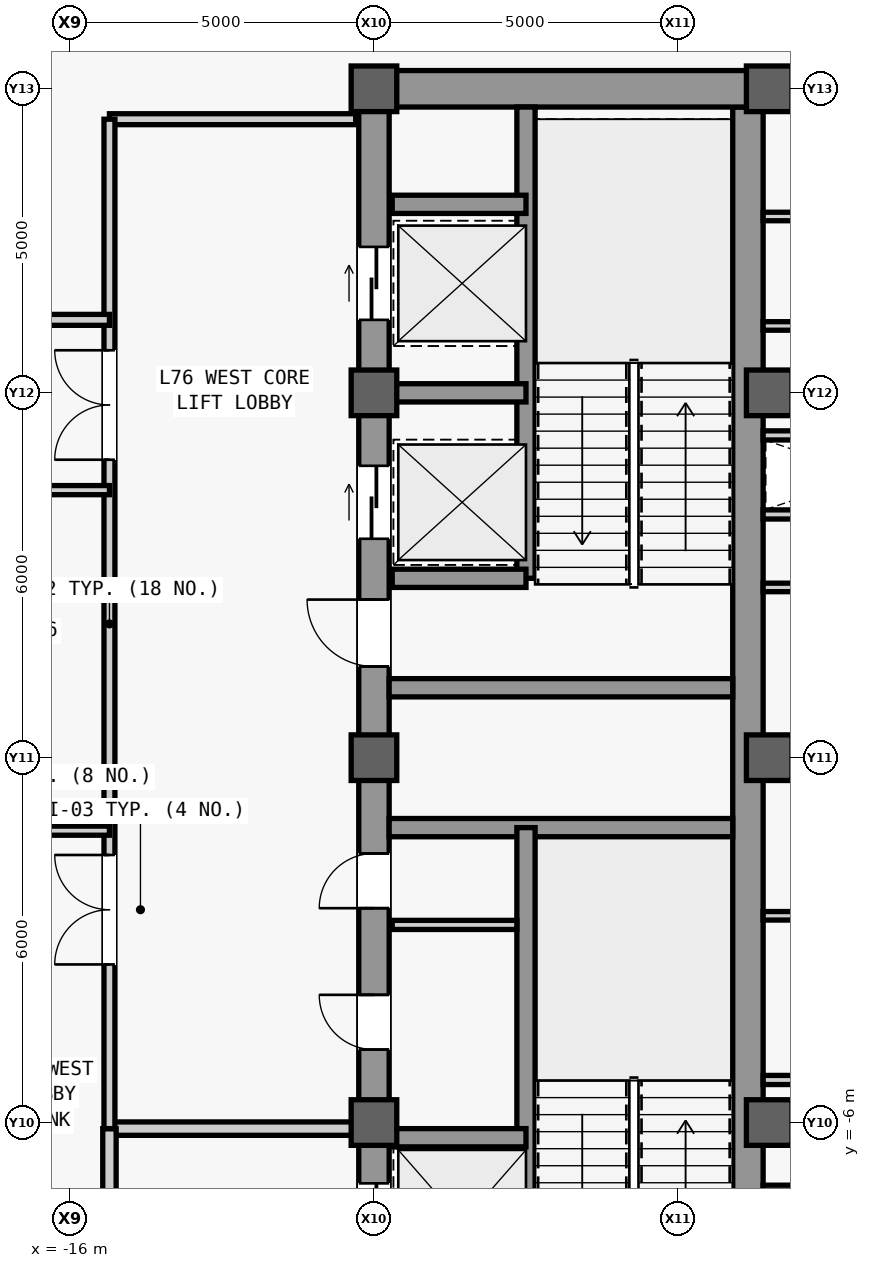
"""IFC4 building model, lengths in metres.
Left out: names, types, materials, properties, quantities, classifications, styles, units other than length and angle.
Written with IfcOpenShell. Run it as: python <this file> out.ifc"""

import sys

from ifc_helpers import new_model, si_unit, direction, frame, frame_2d, origin, origin_2d, place, context, subcontext, project, spatial, rectangle, extrude, source, transform, mapped, element, fill, save


model = new_model("IFC4")
c1 = context("Model", 3, precision=1e-05, world=origin(), true_north=direction((0.0, 1.0)))
c2 = subcontext(c1, "Body", "Model", "MODEL_VIEW")
j1 = project(units=[si_unit("LENGTHUNIT", "METRE"), si_unit("PLANEANGLEUNIT", "RADIAN")], contexts=[c1])
p1 = place(None, origin())
s1 = spatial("IfcSite", under=j1, at=p1, CompositionType="ELEMENT")
p2 = place(p1, origin())
s2 = spatial("IfcBuilding", under=s1, at=p2, CompositionType="ELEMENT")
p3 = place(p2, frame((0.0, 0.0, 321.5)))
s3 = spatial("IfcBuildingStorey", under=s2, at=p3, CompositionType="ELEMENT", Elevation=321.5)
m1 = source(origin(), c2, "Body", "SweptSolid", [
    extrude(rectangle(XDim=22.0, YDim=0.5, at=frame_2d((11.0, 0.0))), origin(), (0.0, 0.0, 1.0), 4.54),
])
p4 = place(p3, frame((-11.0, -11.0, 0.0), z_axis=(0.0, 0.0, 1.0), x_axis=(0.0, 1.0, 0.0)))
e1 = element("IfcWall", 1, at=p4, inside=s3, PredefinedType="SHEAR", context=c2, shape_type="MappedRepresentation", body=[
    mapped(m1, transform((0.0, 0.0, 0.0), scale=1.0)),
])
m2 = source(origin(), c2, "Body", "SweptSolid", [
    extrude(rectangle(XDim=1.1, YDim=2.2, at=frame_2d((0.55, 1.1))), frame((0.0, 0.26, 0.0), z_axis=(0.0, -1.0, 0.0), x_axis=(1.0, 0.0, 0.0)), (0.0, 0.0, 1.0), 0.52),
])
p5 = place(p4, frame((0.8, 0.0, 0.0)))
e2 = element("IfcOpeningElement", 2, at=p5, cuts=e1, PredefinedType="OPENING", context=c2, shape_type="MappedRepresentation", body=[
    mapped(m2, transform((0.0, 0.0, 0.0), scale=1.0)),
])
p6 = place(p4, frame((12.5, 0.0, 0.0)))
e3 = element("IfcOpeningElement", 3, at=p6, cuts=e1, PredefinedType="OPENING", context=c2, shape_type="MappedRepresentation", body=[
    mapped(m2, transform((0.0, 0.0, 0.0), scale=1.0)),
])
m3 = source(origin(), c2, "Body", "SweptSolid", [
    extrude(rectangle(XDim=0.9, YDim=2.15, at=frame_2d((0.45, 1.075))), frame((0.0, 0.26, 0.0), z_axis=(0.0, -1.0, 0.0), x_axis=(1.0, 0.0, 0.0)), (0.0, 0.0, 1.0), 0.52),
])
p7 = place(p4, frame((6.2, 0.0, 0.0)))
e4 = element("IfcOpeningElement", 4, at=p7, cuts=e1, PredefinedType="OPENING", context=c2, shape_type="MappedRepresentation", body=[
    mapped(m3, transform((0.0, 0.0, 0.0), scale=1.0)),
])
p8 = place(p4, frame((8.525, 0.0, 0.0)))
e5 = element("IfcOpeningElement", 5, at=p8, cuts=e1, PredefinedType="OPENING", context=c2, shape_type="MappedRepresentation", body=[
    mapped(m3, transform((0.0, 0.0, 0.0), scale=1.0)),
])
m4 = source(origin(), c2, "Body", "SweptSolid", [
    extrude(rectangle(XDim=1.2, YDim=2.3, at=frame_2d((0.6, 1.15))), frame((0.0, 0.26, 0.0), z_axis=(0.0, -1.0, 0.0), x_axis=(1.0, 0.0, 0.0)), (0.0, 0.0, 1.0), 0.52),
])
p9 = place(p4, frame((14.6, 0.0, 0.0)))
e6 = element("IfcOpeningElement", 6, at=p9, cuts=e1, PredefinedType="OPENING", context=c2, shape_type="MappedRepresentation", body=[
    mapped(m4, transform((0.0, 0.0, 0.0), scale=1.0)),
])
p10 = place(p4, frame((18.2, 0.0, 0.0)))
e7 = element("IfcOpeningElement", 7, at=p10, cuts=e1, PredefinedType="OPENING", context=c2, shape_type="MappedRepresentation", body=[
    mapped(m4, transform((0.0, 0.0, 0.0), scale=1.0)),
])
m5 = source(origin(), c2, "Body", "SweptSolid", [
    extrude(rectangle(XDim=1.3, YDim=2.3, at=frame_2d((0.65, 1.15))), frame((0.0, 0.26, 0.0), z_axis=(0.0, -1.0, 0.0), x_axis=(1.0, 0.0, 0.0)), (0.0, 0.0, 1.0), 0.52),
])
p11 = place(p4, frame((2.7, 0.0, 0.0)))
e8 = element("IfcOpeningElement", 8, at=p11, cuts=e1, PredefinedType="OPENING", context=c2, shape_type="MappedRepresentation", body=[
    mapped(m5, transform((0.0, 0.0, 0.0), scale=1.0)),
])
m6 = source(origin(), c2, "Body", "SweptSolid", [
    extrude(rectangle(XDim=21.4, YDim=0.5, at=frame_2d((10.7, 0.0))), origin(), (0.0, 0.0, 1.0), 4.54),
])
p12 = place(p3, frame((-4.85, -10.7, 0.0), z_axis=(0.0, 0.0, 1.0), x_axis=(0.0, 1.0, 0.0)))
e9 = element("IfcWall", 9, at=p12, inside=s3, PredefinedType="SHEAR", context=c2, shape_type="MappedRepresentation", body=[
    mapped(m6, transform((0.0, 0.0, 0.0), scale=1.0)),
])
m7 = source(origin(), c2, "Body", "SweptSolid", [
    extrude(rectangle(XDim=5.9, YDim=0.6, at=frame_2d((2.95, 0.0))), origin(), (0.0, 0.0, 1.0), 4.54),
])
p13 = place(p3, frame((-10.75, 11.0, 0.0), z_axis=(0.0, 0.0, 1.0), x_axis=(1.0, 0.0, 0.0)))
e10 = element("IfcWall", 10, at=p13, inside=s3, PredefinedType="SHEAR", context=c2, shape_type="MappedRepresentation", body=[
    mapped(m7, transform((0.0, 0.0, 0.0), scale=1.0)),
])
m8 = source(origin(), c2, "Body", "SweptSolid", [
    extrude(rectangle(XDim=5.65, YDim=0.3, at=frame_2d((2.825, 0.0))), origin(), (0.0, 0.0, 1.0), 4.54),
])
for number, where, z_axis, x_axis in (
    (11, (-10.75, -1.15, 0.0), (0.0, 0.0, 1.0), (1.0, 0.0, 0.0)),
    (12, (-10.75, 1.15, 0.0), (0.0, 0.0, 1.0), (1.0, 0.0, 0.0)),
):
    element("IfcWall", number, at=place(p3, frame(where, z_axis=z_axis, x_axis=x_axis)), inside=s3, PredefinedType="SHEAR", context=c2, shape_type="MappedRepresentation", body=[
        mapped(m8, transform((0.0, 0.0, 0.0), scale=1.0)),
    ])
m9 = source(origin(), c2, "Body", "SweptSolid", [
    extrude(rectangle(XDim=9.2, YDim=0.5, at=frame_2d((4.6, 0.0))), origin(), (0.0, 0.0, 1.0), 4.54),
])
p14 = place(p3, frame((-4.6, 11.0, 0.0), z_axis=(0.0, 0.0, 1.0), x_axis=(1.0, 0.0, 0.0)))
e13 = element("IfcWall", 13, at=p14, inside=s3, PredefinedType="SHEAR", context=c2, shape_type="MappedRepresentation", body=[
    mapped(m9, transform((0.0, 0.0, 0.0), scale=1.0)),
])
m10 = source(origin(), c2, "Body", "SweptSolid", [
    extrude(rectangle(XDim=0.75, YDim=0.75, at=origin_2d()), origin(), (0.0, 0.0, 1.0), 4.8),
])
for number, where, z_axis, x_axis in (
    (14, (-11.0, -6.0, 0.0), (0.0, 0.0, 1.0), (1.0, 0.0, 0.0)),
    (15, (-11.0, 0.0, 0.0), (0.0, 0.0, 1.0), (1.0, 0.0, 0.0)),
    (16, (-11.0, 6.0, 0.0), (0.0, 0.0, 1.0), (1.0, 0.0, 0.0)),
    (17, (-11.0, 11.0, 0.0), (0.0, 0.0, 1.0), (1.0, 0.0, 0.0)),
    (18, (-4.5, -6.0, 0.0), (0.0, 0.0, 1.0), (1.0, 0.0, 0.0)),
    (19, (-4.5, 0.0, 0.0), (0.0, 0.0, 1.0), (1.0, 0.0, 0.0)),
    (20, (-4.5, 6.0, 0.0), (0.0, 0.0, 1.0), (1.0, 0.0, 0.0)),
    (21, (-4.5, 11.0, 0.0), (0.0, 0.0, 1.0), (1.0, 0.0, 0.0)),
):
    element("IfcColumn", number, at=place(p3, frame(where, z_axis=z_axis, x_axis=x_axis)), inside=s3, PredefinedType="COLUMN", context=c2, shape_type="MappedRepresentation", body=[
        mapped(m10, transform((0.0, 0.0, 0.0), scale=1.0)),
    ])
m11 = source(origin(), c2, "Body", "SweptSolid", [
    extrude(rectangle(XDim=7.8, YDim=0.3, at=frame_2d((3.9, 0.0))), origin(), (0.0, 0.0, 1.0), 4.54),
])
p15 = place(p3, frame((-8.5, -8.95, 0.0), z_axis=(0.0, 0.0, 1.0), x_axis=(0.0, 1.0, 0.0)))
e22 = element("IfcWall", 22, at=p15, inside=s3, PredefinedType="SHEAR", context=c2, shape_type="MappedRepresentation", body=[
    mapped(m11, transform((0.0, 0.0, 0.0), scale=1.0)),
])
m12 = source(origin(), c2, "Body", "SweptSolid", [
    extrude(rectangle(XDim=2.2, YDim=0.3, at=frame_2d((1.1, 0.0))), origin(), (0.0, 0.0, 1.0), 4.54),
])
p16 = place(p3, frame((-10.7, -6.25, 0.0), z_axis=(0.0, 0.0, 1.0), x_axis=(1.0, 0.0, 0.0)))
e23 = element("IfcWall", 23, at=p16, inside=s3, PredefinedType="SHEAR", context=c2, shape_type="MappedRepresentation", body=[
    mapped(m12, transform((0.0, 0.0, 0.0), scale=1.0)),
])
m13 = source(origin(), c2, "Body", "SweptSolid", [
    extrude(rectangle(XDim=7.75, YDim=0.3, at=frame_2d((3.875, 0.0))), origin(), (0.0, 0.0, 1.0), 4.54),
])
p17 = place(p3, frame((-8.5, 2.95, 0.0), z_axis=(0.0, 0.0, 1.0), x_axis=(0.0, 1.0, 0.0)))
e24 = element("IfcWall", 24, at=p17, inside=s3, PredefinedType="SHEAR", context=c2, shape_type="MappedRepresentation", body=[
    mapped(m13, transform((0.0, 0.0, 0.0), scale=1.0)),
])
for number, where, z_axis, x_axis in (
    (25, (-10.7, 2.95, 0.0), (0.0, 0.0, 1.0), (1.0, 0.0, 0.0)),
    (26, (-10.7, 6.0, 0.0), (0.0, 0.0, 1.0), (1.0, 0.0, 0.0)),
    (27, (-10.7, 9.1, 0.0), (0.0, 0.0, 1.0), (1.0, 0.0, 0.0)),
):
    element("IfcWall", number, at=place(p3, frame(where, z_axis=z_axis, x_axis=x_axis)), inside=s3, PredefinedType="SHEAR", context=c2, shape_type="MappedRepresentation", body=[
        mapped(m12, transform((0.0, 0.0, 0.0), scale=1.0)),
    ])
m14 = source(origin(), c2, "Body", "SweptSolid", [
    extrude(rectangle(XDim=2.05, YDim=0.15, at=frame_2d((1.025, 0.0))), origin(), (0.0, 0.0, 1.0), 4.54),
])
p18 = place(p3, frame((-10.7, -2.75, 0.0), z_axis=(0.0, 0.0, 1.0), x_axis=(1.0, 0.0, 0.0)))
e28 = element("IfcWall", 28, at=p18, inside=s3, PredefinedType="PARTITIONING", context=c2, shape_type="MappedRepresentation", body=[
    mapped(m14, transform((0.0, 0.0, 0.0), scale=1.0)),
])
m15 = source(origin(), c2, "Body", "SweptSolid", [
    extrude(rectangle(XDim=4.05, YDim=0.22, at=frame_2d((2.025, 0.0))), origin(), (0.0, 0.0, 1.0), 2.74),
])
p19 = place(p3, frame((-15.35, -6.1, 0.0), z_axis=(0.0, 0.0, 1.0), x_axis=(1.0, 0.0, 0.0)))
e29 = element("IfcWall", 29, at=p19, inside=s3, PredefinedType="PARTITIONING", context=c2, shape_type="MappedRepresentation", body=[
    mapped(m15, transform((0.0, 0.0, 0.0), scale=1.0)),
])
m16 = source(origin(), c2, "Body", "SweptSolid", [
    extrude(rectangle(XDim=4.4, YDim=0.22, at=frame_2d((2.2, 0.0))), origin(), (0.0, 0.0, 1.0), 4.54),
])
p20 = place(p3, frame((-15.35, -10.5, 0.0), z_axis=(0.0, 0.0, 1.0), x_axis=(0.0, 1.0, 0.0)))
e30 = element("IfcWall", 30, at=p20, inside=s3, PredefinedType="PARTITIONING", context=c2, shape_type="MappedRepresentation", body=[
    mapped(m16, transform((0.0, 0.0, 0.0), scale=1.0)),
])
m17 = source(origin(), c2, "Body", "SweptSolid", [
    extrude(rectangle(XDim=1.2, YDim=2.2, at=frame_2d((0.6, 1.1))), frame((0.0, 0.12, 0.0), z_axis=(0.0, -1.0, 0.0), x_axis=(1.0, 0.0, 0.0)), (0.0, 0.0, 1.0), 0.24),
])
p21 = place(p20, frame((1.6, 0.0, 0.0)))
e31 = element("IfcOpeningElement", 31, at=p21, cuts=e30, PredefinedType="OPENING", context=c2, shape_type="MappedRepresentation", body=[
    mapped(m17, transform((0.0, 0.0, 0.0), scale=1.0)),
])
m18 = source(origin(), c2, "Body", "SweptSolid", [
    extrude(rectangle(XDim=4.05, YDim=0.18, at=frame_2d((2.025, 0.0))), origin(), (0.0, 0.0, 1.0), 4.54),
])
p22 = place(p3, frame((-15.35, 10.5, 0.0), z_axis=(0.0, 0.0, 1.0), x_axis=(1.0, 0.0, 0.0)))
e32 = element("IfcWall", 32, at=p22, inside=s3, PredefinedType="PARTITIONING", context=c2, shape_type="MappedRepresentation", body=[
    mapped(m18, transform((0.0, 0.0, 0.0), scale=1.0)),
])
m19 = source(origin(), c2, "Body", "SweptSolid", [
    extrude(rectangle(XDim=16.6, YDim=0.18, at=frame_2d((8.3, 0.0))), origin(), (0.0, 0.0, 1.0), 4.54),
])
p23 = place(p3, frame((-15.35, -6.1, 0.0), z_axis=(0.0, 0.0, 1.0), x_axis=(0.0, 1.0, 0.0)))
e33 = element("IfcWall", 33, at=p23, inside=s3, PredefinedType="PARTITIONING", context=c2, shape_type="MappedRepresentation", body=[
    mapped(m19, transform((0.0, 0.0, 0.0), scale=1.0)),
])
m20 = source(origin(), c2, "Body", "SweptSolid", [
    extrude(rectangle(XDim=1.8, YDim=2.25, at=frame_2d((0.9, 1.125))), frame((0.0, 0.1, 0.0), z_axis=(0.0, -1.0, 0.0), x_axis=(1.0, 0.0, 0.0)), (0.0, 0.0, 1.0), 0.2),
])
p24 = place(p23, frame((2.7, 0.0, 0.0)))
e34 = element("IfcOpeningElement", 34, at=p24, cuts=e33, PredefinedType="OPENING", context=c2, shape_type="MappedRepresentation", body=[
    mapped(m20, transform((0.0, 0.0, 0.0), scale=1.0)),
])
p25 = place(p23, frame((11.0, 0.0, 0.0)))
e35 = element("IfcOpeningElement", 35, at=p25, cuts=e33, PredefinedType="OPENING", context=c2, shape_type="MappedRepresentation", body=[
    mapped(m20, transform((0.0, 0.0, 0.0), scale=1.0)),
])
m21 = source(origin(), c2, "Body", "SweptSolid", [
    extrude(rectangle(XDim=3.45, YDim=0.15, at=frame_2d((1.725, 0.0))), origin(), (0.0, 0.0, 1.0), 4.54),
])
p26 = place(p3, frame((-4.6, 4.0, 0.0), z_axis=(0.0, 0.0, 1.0), x_axis=(1.0, 0.0, 0.0)))
e36 = element("IfcWall", 36, at=p26, inside=s3, PredefinedType="PARTITIONING", context=c2, shape_type="MappedRepresentation", body=[
    mapped(m21, transform((0.0, 0.0, 0.0), scale=1.0)),
])
m22 = source(origin(), c2, "Body", "SweptSolid", [
    extrude(rectangle(XDim=3.45, YDim=0.14, at=frame_2d((1.725, 0.0))), origin(), (0.0, 0.0, 1.0), 4.54),
])
p27 = place(p3, frame((-4.6, -7.1, 0.0), z_axis=(0.0, 0.0, 1.0), x_axis=(1.0, 0.0, 0.0)))
e37 = element("IfcWall", 37, at=p27, inside=s3, PredefinedType="PARTITIONING", context=c2, shape_type="MappedRepresentation", body=[
    mapped(m22, transform((0.0, 0.0, 0.0), scale=1.0)),
])
p28 = place(p3, frame((-4.6, -5.3, 0.0), z_axis=(0.0, 0.0, 1.0), x_axis=(1.0, 0.0, 0.0)))
e38 = element("IfcWall", 38, at=p28, inside=s3, PredefinedType="PARTITIONING", context=c2, shape_type="MappedRepresentation", body=[
    mapped(m21, transform((0.0, 0.0, 0.0), scale=1.0)),
])
for number, where, z_axis, x_axis in (
    (39, (-4.6, 7.1, 0.0), (0.0, 0.0, 1.0), (1.0, 0.0, 0.0)),
    (40, (-4.6, 8.9, 0.0), (0.0, 0.0, 1.0), (1.0, 0.0, 0.0)),
):
    element("IfcWall", number, at=place(p3, frame(where, z_axis=z_axis, x_axis=x_axis)), inside=s3, PredefinedType="PARTITIONING", context=c2, shape_type="MappedRepresentation", body=[
        mapped(m22, transform((0.0, 0.0, 0.0), scale=1.0)),
    ])
p29 = place(p3, frame((-4.6, 5.3, 0.0), z_axis=(0.0, 0.0, 1.0), x_axis=(1.0, 0.0, 0.0)))
e41 = element("IfcWall", 41, at=p29, inside=s3, PredefinedType="PARTITIONING", context=c2, shape_type="MappedRepresentation", body=[
    mapped(m21, transform((0.0, 0.0, 0.0), scale=1.0)),
])
p30 = place(p3, frame((-4.6, -2.6, 0.0), z_axis=(0.0, 0.0, 1.0), x_axis=(1.0, 0.0, 0.0)))
e42 = element("IfcWall", 42, at=p30, inside=s3, PredefinedType="PARTITIONING", context=c2, shape_type="MappedRepresentation", body=[
    mapped(m22, transform((0.0, 0.0, 0.0), scale=1.0)),
])
m23 = source(origin(), c2, "Body", "SweptSolid", [
    extrude(rectangle(XDim=3.45, YDim=0.14, at=frame_2d((1.725, 0.0))), origin(), (0.0, 0.0, 1.0), 3.845),
])
p31 = place(p3, frame((-4.6, 0.2, 0.0), z_axis=(0.0, 0.0, 1.0), x_axis=(1.0, 0.0, 0.0)))
e43 = element("IfcWall", 43, at=p31, inside=s3, PredefinedType="PARTITIONING", context=c2, shape_type="MappedRepresentation", body=[
    mapped(m23, transform((0.0, 0.0, 0.0), scale=1.0)),
])
p32 = place(p3, frame((-4.6, 2.8, 0.0), z_axis=(0.0, 0.0, 1.0), x_axis=(1.0, 0.0, 0.0)))
e44 = element("IfcWall", 44, at=p32, inside=s3, PredefinedType="PARTITIONING", context=c2, shape_type="MappedRepresentation", body=[
    mapped(m22, transform((0.0, 0.0, 0.0), scale=1.0)),
])
m24 = source(origin(), c2, "Body", "SweptSolid", [
    extrude(rectangle(XDim=2.05, YDim=0.15, at=frame_2d((1.025, 0.0))), origin(), (0.0, 0.0, 1.0), 4.54),
])
for number, where, z_axis, x_axis in (
    (45, (-17.4, -1.2, 0.0), (0.0, 0.0, 1.0), (1.0, 0.0, 0.0)),
    (46, (-17.4, 4.4, 0.0), (0.0, 0.0, 1.0), (1.0, 0.0, 0.0)),
):
    element("IfcWall", number, at=place(p3, frame(where, z_axis=z_axis, x_axis=x_axis)), inside=s3, PredefinedType="PARTITIONING", context=c2, shape_type="MappedRepresentation", body=[
        mapped(m24, transform((0.0, 0.0, 0.0), scale=1.0)),
    ])
m25 = source(origin(), c2, "Body", "SweptSolid", [
    extrude(rectangle(XDim=2.05, YDim=0.18, at=frame_2d((1.025, 0.0))), origin(), (0.0, 0.0, 1.0), 4.54),
])
p33 = place(p3, frame((-17.4, 7.2, 0.0), z_axis=(0.0, 0.0, 1.0), x_axis=(1.0, 0.0, 0.0)))
e47 = element("IfcWall", 47, at=p33, inside=s3, PredefinedType="PARTITIONING", context=c2, shape_type="MappedRepresentation", body=[
    mapped(m25, transform((0.0, 0.0, 0.0), scale=1.0)),
])
m26 = source(origin(), c2, "Body", "SweptSolid", [
    extrude(rectangle(XDim=1.1, YDim=2.2, at=frame_2d((0.55, 1.1))), frame((0.0, 0.025, 0.0), z_axis=(0.0, -1.0, 0.0), x_axis=(1.0, 0.0, 0.0)), (0.0, 0.0, 1.0), 0.05),
])
p34 = place(p6, origin())
e48 = element("IfcDoor", 48, at=p34, inside=s3, OperationType="SINGLE_SWING_RIGHT", PredefinedType="DOOR", context=c2, shape_type="MappedRepresentation", body=[
    mapped(m26, transform((0.0, 0.0, 0.0), scale=1.0)),
])
fill(e3, e48)
m27 = source(origin(), c2, "Body", "SweptSolid", [
    extrude(rectangle(XDim=0.9, YDim=2.15, at=frame_2d((0.45, 1.075))), frame((0.0, 0.025, 0.0), z_axis=(0.0, -1.0, 0.0), x_axis=(1.0, 0.0, 0.0)), (0.0, 0.0, 1.0), 0.05),
])
p35 = place(p7, origin())
e49 = element("IfcDoor", 49, at=p35, inside=s3, OperationType="SINGLE_SWING_RIGHT", PredefinedType="DOOR", context=c2, shape_type="MappedRepresentation", body=[
    mapped(m27, transform((0.0, 0.0, 0.0), scale=1.0)),
])
fill(e4, e49)
p36 = place(p8, origin())
e50 = element("IfcDoor", 50, at=p36, inside=s3, OperationType="SINGLE_SWING_LEFT", PredefinedType="DOOR", context=c2, shape_type="MappedRepresentation", body=[
    mapped(m27, transform((0.0, 0.0, 0.0), scale=1.0)),
])
fill(e5, e50)
m28 = source(origin(), c2, "Body", "SweptSolid", [
    extrude(rectangle(XDim=1.8, YDim=2.25, at=frame_2d((0.9, 1.125))), frame((0.0, 0.025, 0.0), z_axis=(0.0, -1.0, 0.0), x_axis=(1.0, 0.0, 0.0)), (0.0, 0.0, 1.0), 0.05),
])
p37 = place(p24, origin())
e51 = element("IfcDoor", 51, at=p37, inside=s3, OperationType="SINGLE_SWING_LEFT", PredefinedType="DOOR", context=c2, shape_type="MappedRepresentation", body=[
    mapped(m28, transform((0.0, 0.0, 0.0), scale=1.0)),
])
fill(e34, e51)
p38 = place(p25, origin())
e52 = element("IfcDoor", 52, at=p38, inside=s3, OperationType="SINGLE_SWING_RIGHT", PredefinedType="DOOR", context=c2, shape_type="MappedRepresentation", body=[
    mapped(m28, transform((0.0, 0.0, 0.0), scale=1.0)),
])
fill(e35, e52)
m29 = source(origin(), c2, "Body", "SweptSolid", [
    extrude(rectangle(XDim=1.2, YDim=2.3, at=frame_2d((0.6, 1.15))), frame((0.0, 0.025, 0.0), z_axis=(0.0, -1.0, 0.0), x_axis=(1.0, 0.0, 0.0)), (0.0, 0.0, 1.0), 0.05),
])
p39 = place(p9, origin())
e53 = element("IfcDoor", 53, at=p39, inside=s3, OperationType="SLIDING_TO_LEFT", PredefinedType="DOOR", context=c2, shape_type="MappedRepresentation", body=[
    mapped(m29, transform((0.0, 0.0, 0.0), scale=1.0)),
])
fill(e6, e53)
p40 = place(p10, origin())
e54 = element("IfcDoor", 54, at=p40, inside=s3, OperationType="SLIDING_TO_LEFT", PredefinedType="DOOR", context=c2, shape_type="MappedRepresentation", body=[
    mapped(m29, transform((0.0, 0.0, 0.0), scale=1.0)),
])
fill(e7, e54)
m30 = source(origin(), c2, "Body", "SweptSolid", [
    extrude(rectangle(XDim=1.3, YDim=2.3, at=frame_2d((0.65, 1.15))), frame((0.0, 0.025, 0.0), z_axis=(0.0, -1.0, 0.0), x_axis=(1.0, 0.0, 0.0)), (0.0, 0.0, 1.0), 0.05),
])
p41 = place(p11, origin())
e55 = element("IfcDoor", 55, at=p41, inside=s3, OperationType="SLIDING_TO_LEFT", PredefinedType="DOOR", context=c2, shape_type="MappedRepresentation", body=[
    mapped(m30, transform((0.0, 0.0, 0.0), scale=1.0)),
])
fill(e8, e55)
save(model, sys.argv[1])
